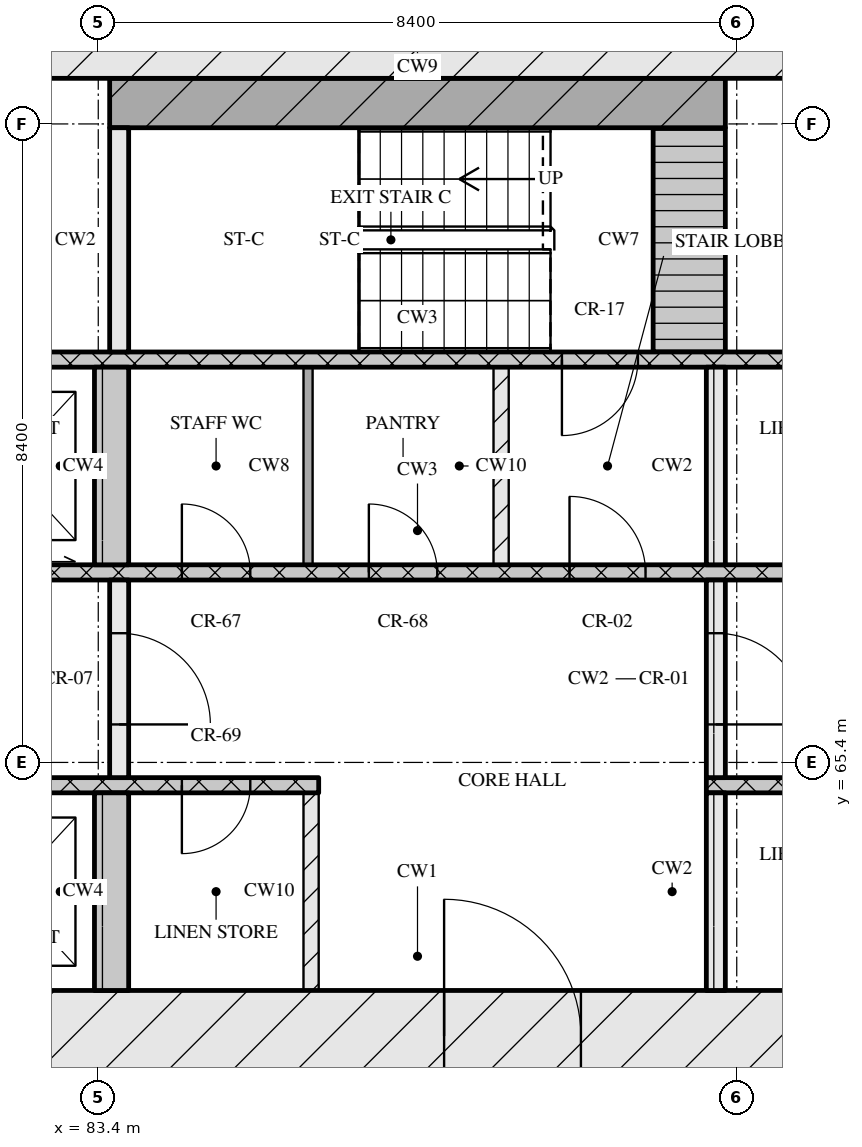
"""IFC4 building model, lengths in metres.
Left out: names, types, materials, properties, quantities, classifications, styles, units other than length and angle.
Written with IfcOpenShell. Run it as: python <this file> out.ifc"""

import sys

from ifc_helpers import new_model, si_unit, direction, frame, frame_2d, origin, place, context, subcontext, project, spatial, rectangle, extrude, element, fill, save


model = new_model("IFC4")
c1 = context("Model", 3, precision=1e-05, world=origin(), true_north=direction((0.0, 1.0)))
c2 = subcontext(c1, "Body", "Model", "MODEL_VIEW")
j1 = project(units=[si_unit("LENGTHUNIT", "METRE"), si_unit("PLANEANGLEUNIT", "RADIAN")], contexts=[c1])
p1 = place(None, origin())
s1 = spatial("IfcSite", under=j1, at=p1, CompositionType="ELEMENT")
p2 = place(p1, origin())
s2 = spatial("IfcBuilding", under=s1, at=p2, CompositionType="ELEMENT")
p3 = place(p2, frame((0.0, 0.0, 73.2)))
s3 = spatial("IfcBuildingStorey", under=s2, at=p3, CompositionType="ELEMENT", Elevation=73.2)
p4 = place(p3, frame((66.6, 61.8, 0.0), z_axis=(0.0, 0.0, 1.0), x_axis=(1.0, 0.0, 0.0)))
e1 = element("IfcWall", 1, at=p4, inside=s3, PredefinedType="SOLIDWALL", context=c2, shape_type="SweptSolid", body=[
    extrude(rectangle(XDim=42.0, YDim=1.2, at=frame_2d((21.0, 0.0))), origin(), (0.0, 0.0, 1.0), 3.32),
])
p5 = place(p4, frame((21.35, 0.0, 0.0)))
e2 = element("IfcOpeningElement", 2, at=p5, cuts=e1, PredefinedType="OPENING", context=c2, shape_type="SweptSolid", body=[
    extrude(rectangle(XDim=1.8, YDim=2.1, at=frame_2d((0.9, 1.05))), frame((0.0, 0.61, 0.0), z_axis=(0.0, -1.0, 0.0), x_axis=(1.0, 0.0, 0.0)), (0.0, 0.0, 1.0), 1.22),
])
p6 = place(p3, frame((66.6, 75.0, 0.0), z_axis=(0.0, 0.0, 1.0), x_axis=(1.0, 0.0, 0.0)))
e3 = element("IfcWall", 3, at=p6, inside=s3, PredefinedType="SOLIDWALL", context=c2, shape_type="SweptSolid", body=[
    extrude(rectangle(XDim=42.0, YDim=1.2, at=frame_2d((21.0, 0.0))), origin(), (0.0, 0.0, 1.0), 3.32),
])
p7 = place(p3, frame((83.575, 62.4, 0.0), z_axis=(0.0, 0.0, 1.0), x_axis=(0.0, 1.0, 0.0)))
e4 = element("IfcWall", 4, at=p7, inside=s3, PredefinedType="SOLIDWALL", context=c2, shape_type="SweptSolid", body=[
    extrude(rectangle(XDim=2.6, YDim=0.45, at=frame_2d((1.3, 0.0))), origin(), (0.0, 0.0, 1.0), 3.32),
])
p8 = place(p3, frame((86.2, 62.4, 0.0), z_axis=(0.0, 0.0, 1.0), x_axis=(0.0, 1.0, 0.0)))
e5 = element("IfcWall", 5, at=p8, inside=s3, PredefinedType="PARTITIONING", context=c2, shape_type="SweptSolid", body=[
    extrude(rectangle(XDim=2.6, YDim=0.2, at=frame_2d((1.3, 0.0))), origin(), (0.0, 0.0, 1.0), 3.32),
])
p9 = place(p3, frame((91.525, 62.4, 0.0), z_axis=(0.0, 0.0, 1.0), x_axis=(0.0, 1.0, 0.0)))
e6 = element("IfcWall", 6, at=p9, inside=s3, PredefinedType="SOLIDWALL", context=c2, shape_type="SweptSolid", body=[
    extrude(rectangle(XDim=2.6, YDim=0.25, at=frame_2d((1.3, 0.0))), origin(), (0.0, 0.0, 1.0), 3.32),
])
p10 = place(p3, frame((67.8, 65.1, 0.0), z_axis=(0.0, 0.0, 1.0), x_axis=(1.0, 0.0, 0.0)))
e7 = element("IfcWall", 7, at=p10, inside=s3, PredefinedType="SOLIDWALL", context=c2, shape_type="SweptSolid", body=[
    extrude(rectangle(XDim=18.5, YDim=0.2, at=frame_2d((9.25, 0.0))), origin(), (0.0, 0.0, 1.0), 3.32),
])
p11 = place(p10, frame((7.27, 0.0, 0.0)))
e8 = element("IfcOpeningElement", 8, at=p11, cuts=e7, PredefinedType="OPENING", context=c2, shape_type="SweptSolid", body=[
    extrude(rectangle(XDim=0.9, YDim=2.1, at=frame_2d((0.45, 1.05))), frame((0.0, 0.11, 0.0), z_axis=(0.0, -1.0, 0.0), x_axis=(1.0, 0.0, 0.0)), (0.0, 0.0, 1.0), 0.22),
])
p12 = place(p10, frame((8.85, 0.0, 0.0)))
e9 = element("IfcOpeningElement", 9, at=p12, cuts=e7, PredefinedType="OPENING", context=c2, shape_type="SweptSolid", body=[
    extrude(rectangle(XDim=1.1, YDim=2.1, at=frame_2d((0.55, 1.05))), frame((0.0, 0.11, 0.0), z_axis=(0.0, -1.0, 0.0), x_axis=(1.0, 0.0, 0.0)), (0.0, 0.0, 1.0), 0.22),
])
p13 = place(p10, frame((11.35, 0.0, 0.0)))
e10 = element("IfcOpeningElement", 10, at=p13, cuts=e7, PredefinedType="OPENING", context=c2, shape_type="SweptSolid", body=[
    extrude(rectangle(XDim=1.1, YDim=2.1, at=frame_2d((0.55, 1.05))), frame((0.0, 0.11, 0.0), z_axis=(0.0, -1.0, 0.0), x_axis=(1.0, 0.0, 0.0)), (0.0, 0.0, 1.0), 0.22),
])
p14 = place(p10, frame((13.85, 0.0, 0.0)))
e11 = element("IfcOpeningElement", 11, at=p14, cuts=e7, PredefinedType="OPENING", context=c2, shape_type="SweptSolid", body=[
    extrude(rectangle(XDim=1.1, YDim=2.1, at=frame_2d((0.55, 1.05))), frame((0.0, 0.11, 0.0), z_axis=(0.0, -1.0, 0.0), x_axis=(1.0, 0.0, 0.0)), (0.0, 0.0, 1.0), 0.22),
])
p15 = place(p10, frame((16.7, 0.0, 0.0)))
e12 = element("IfcOpeningElement", 12, at=p15, cuts=e7, PredefinedType="OPENING", context=c2, shape_type="SweptSolid", body=[
    extrude(rectangle(XDim=0.9, YDim=2.1, at=frame_2d((0.45, 1.05))), frame((0.0, 0.11, 0.0), z_axis=(0.0, -1.0, 0.0), x_axis=(1.0, 0.0, 0.0)), (0.0, 0.0, 1.0), 0.22),
])
p16 = place(p3, frame((91.4, 65.1, 0.0), z_axis=(0.0, 0.0, 1.0), x_axis=(1.0, 0.0, 0.0)))
e13 = element("IfcWall", 13, at=p16, inside=s3, PredefinedType="SOLIDWALL", context=c2, shape_type="SweptSolid", body=[
    extrude(rectangle(XDim=16.0, YDim=0.2, at=frame_2d((8.0, 0.0))), origin(), (0.0, 0.0, 1.0), 3.32),
])
p17 = place(p16, frame((7.83, 0.0, 0.0)))
e14 = element("IfcOpeningElement", 14, at=p17, cuts=e13, PredefinedType="OPENING", context=c2, shape_type="SweptSolid", body=[
    extrude(rectangle(XDim=0.9, YDim=2.1, at=frame_2d((0.45, 1.05))), frame((0.0, 0.11, 0.0), z_axis=(0.0, -1.0, 0.0), x_axis=(1.0, 0.0, 0.0)), (0.0, 0.0, 1.0), 0.22),
])
p18 = place(p3, frame((83.675, 65.2, 0.0), z_axis=(0.0, 0.0, 1.0), x_axis=(0.0, 1.0, 0.0)))
e15 = element("IfcWall", 15, at=p18, inside=s3, PredefinedType="SOLIDWALL", context=c2, shape_type="SweptSolid", body=[
    extrude(rectangle(XDim=2.6, YDim=0.25, at=frame_2d((1.3, 0.0))), origin(), (0.0, 0.0, 1.0), 3.32),
])
p19 = place(p18, frame((0.7, 0.0, 0.0)))
e16 = element("IfcOpeningElement", 16, at=p19, cuts=e15, PredefinedType="OPENING", context=c2, shape_type="SweptSolid", body=[
    extrude(rectangle(XDim=1.2, YDim=2.1, at=frame_2d((0.6, 1.05))), frame((0.0, 0.135, 0.0), z_axis=(0.0, -1.0, 0.0), x_axis=(1.0, 0.0, 0.0)), (0.0, 0.0, 1.0), 0.27),
])
p20 = place(p3, frame((91.525, 65.2, 0.0), z_axis=(0.0, 0.0, 1.0), x_axis=(0.0, 1.0, 0.0)))
e17 = element("IfcWall", 17, at=p20, inside=s3, PredefinedType="SOLIDWALL", context=c2, shape_type="SweptSolid", body=[
    extrude(rectangle(XDim=2.6, YDim=0.25, at=frame_2d((1.3, 0.0))), origin(), (0.0, 0.0, 1.0), 3.32),
])
p21 = place(p20, frame((0.7, 0.0, 0.0)))
e18 = element("IfcOpeningElement", 18, at=p21, cuts=e17, PredefinedType="OPENING", context=c2, shape_type="SweptSolid", body=[
    extrude(rectangle(XDim=1.2, YDim=2.1, at=frame_2d((0.6, 1.05))), frame((0.0, 0.135, 0.0), z_axis=(0.0, -1.0, 0.0), x_axis=(1.0, 0.0, 0.0)), (0.0, 0.0, 1.0), 0.27),
])
p22 = place(p3, frame((76.05, 67.9, 0.0), z_axis=(0.0, 0.0, 1.0), x_axis=(1.0, 0.0, 0.0)))
e19 = element("IfcWall", 19, at=p22, inside=s3, PredefinedType="SOLIDWALL", context=c2, shape_type="SweptSolid", body=[
    extrude(rectangle(XDim=23.1, YDim=0.2, at=frame_2d((11.55, 0.0))), origin(), (0.0, 0.0, 1.0), 3.32),
])
p23 = place(p22, frame((0.6, 0.0, 0.0)))
e20 = element("IfcOpeningElement", 20, at=p23, cuts=e19, PredefinedType="OPENING", context=c2, shape_type="SweptSolid", body=[
    extrude(rectangle(XDim=1.1, YDim=2.1, at=frame_2d((0.55, 1.05))), frame((0.0, 0.11, 0.0), z_axis=(0.0, -1.0, 0.0), x_axis=(1.0, 0.0, 0.0)), (0.0, 0.0, 1.0), 0.22),
])
p24 = place(p22, frame((3.1, 0.0, 0.0)))
e21 = element("IfcOpeningElement", 21, at=p24, cuts=e19, PredefinedType="OPENING", context=c2, shape_type="SweptSolid", body=[
    extrude(rectangle(XDim=1.1, YDim=2.1, at=frame_2d((0.55, 1.05))), frame((0.0, 0.11, 0.0), z_axis=(0.0, -1.0, 0.0), x_axis=(1.0, 0.0, 0.0)), (0.0, 0.0, 1.0), 0.22),
])
p25 = place(p22, frame((5.6, 0.0, 0.0)))
e22 = element("IfcOpeningElement", 22, at=p25, cuts=e19, PredefinedType="OPENING", context=c2, shape_type="SweptSolid", body=[
    extrude(rectangle(XDim=1.1, YDim=2.1, at=frame_2d((0.55, 1.05))), frame((0.0, 0.11, 0.0), z_axis=(0.0, -1.0, 0.0), x_axis=(1.0, 0.0, 0.0)), (0.0, 0.0, 1.0), 0.22),
])
p26 = place(p22, frame((8.45, 0.0, 0.0)))
e23 = element("IfcOpeningElement", 23, at=p26, cuts=e19, PredefinedType="OPENING", context=c2, shape_type="SweptSolid", body=[
    extrude(rectangle(XDim=0.9, YDim=2.1, at=frame_2d((0.45, 1.05))), frame((0.0, 0.11, 0.0), z_axis=(0.0, -1.0, 0.0), x_axis=(1.0, 0.0, 0.0)), (0.0, 0.0, 1.0), 0.22),
])
p27 = place(p22, frame((10.91, 0.0, 0.0)))
e24 = element("IfcOpeningElement", 24, at=p27, cuts=e19, PredefinedType="OPENING", context=c2, shape_type="SweptSolid", body=[
    extrude(rectangle(XDim=0.9, YDim=2.1, at=frame_2d((0.45, 1.05))), frame((0.0, 0.11, 0.0), z_axis=(0.0, -1.0, 0.0), x_axis=(1.0, 0.0, 0.0)), (0.0, 0.0, 1.0), 0.22),
])
p28 = place(p22, frame((13.55, 0.0, 0.0)))
e25 = element("IfcOpeningElement", 25, at=p28, cuts=e19, PredefinedType="OPENING", context=c2, shape_type="SweptSolid", body=[
    extrude(rectangle(XDim=1.0, YDim=2.1, at=frame_2d((0.5, 1.05))), frame((0.0, 0.11, 0.0), z_axis=(0.0, -1.0, 0.0), x_axis=(1.0, 0.0, 0.0)), (0.0, 0.0, 1.0), 0.22),
])
p29 = place(p3, frame((83.575, 68.0, 0.0), z_axis=(0.0, 0.0, 1.0), x_axis=(0.0, 1.0, 0.0)))
e26 = element("IfcWall", 26, at=p29, inside=s3, PredefinedType="SOLIDWALL", context=c2, shape_type="SweptSolid", body=[
    extrude(rectangle(XDim=2.6, YDim=0.45, at=frame_2d((1.3, 0.0))), origin(), (0.0, 0.0, 1.0), 3.32),
])
p30 = place(p3, frame((86.16, 68.0, 0.0), z_axis=(0.0, 0.0, 1.0), x_axis=(0.0, 1.0, 0.0)))
e27 = element("IfcWall", 27, at=p30, inside=s3, PredefinedType="PARTITIONING", context=c2, shape_type="SweptSolid", body=[
    extrude(rectangle(XDim=2.6, YDim=0.12, at=frame_2d((1.3, 0.0))), origin(), (0.0, 0.0, 1.0), 3.32),
])
p31 = place(p3, frame((88.7, 68.0, 0.0), z_axis=(0.0, 0.0, 1.0), x_axis=(0.0, 1.0, 0.0)))
e28 = element("IfcWall", 28, at=p31, inside=s3, PredefinedType="PARTITIONING", context=c2, shape_type="SweptSolid", body=[
    extrude(rectangle(XDim=2.6, YDim=0.2, at=frame_2d((1.3, 0.0))), origin(), (0.0, 0.0, 1.0), 3.32),
])
p32 = place(p3, frame((91.525, 68.0, 0.0), z_axis=(0.0, 0.0, 1.0), x_axis=(0.0, 1.0, 0.0)))
e29 = element("IfcWall", 29, at=p32, inside=s3, PredefinedType="SOLIDWALL", context=c2, shape_type="SweptSolid", body=[
    extrude(rectangle(XDim=2.6, YDim=0.25, at=frame_2d((1.3, 0.0))), origin(), (0.0, 0.0, 1.0), 3.32),
])
p33 = place(p3, frame((67.8, 70.7, 0.0), z_axis=(0.0, 0.0, 1.0), x_axis=(1.0, 0.0, 0.0)))
e30 = element("IfcWall", 30, at=p33, inside=s3, PredefinedType="SOLIDWALL", context=c2, shape_type="SweptSolid", body=[
    extrude(rectangle(XDim=39.6, YDim=0.2, at=frame_2d((19.8, 0.0))), origin(), (0.0, 0.0, 1.0), 3.32),
])
p34 = place(p33, frame((0.65, 0.0, 0.0)))
e31 = element("IfcOpeningElement", 31, at=p34, cuts=e30, PredefinedType="OPENING", context=c2, shape_type="SweptSolid", body=[
    extrude(rectangle(XDim=1.1, YDim=2.1, at=frame_2d((0.55, 1.05))), frame((0.0, 0.11, 0.0), z_axis=(0.0, -1.0, 0.0), x_axis=(1.0, 0.0, 0.0)), (0.0, 0.0, 1.0), 0.22),
])
p35 = place(p33, frame((3.25, 0.0, 0.0)))
e32 = element("IfcOpeningElement", 32, at=p35, cuts=e30, PredefinedType="OPENING", context=c2, shape_type="SweptSolid", body=[
    extrude(rectangle(XDim=1.1, YDim=2.1, at=frame_2d((0.55, 1.05))), frame((0.0, 0.11, 0.0), z_axis=(0.0, -1.0, 0.0), x_axis=(1.0, 0.0, 0.0)), (0.0, 0.0, 1.0), 0.22),
])
p36 = place(p33, frame((5.9, 0.0, 0.0)))
e33 = element("IfcOpeningElement", 33, at=p36, cuts=e30, PredefinedType="OPENING", context=c2, shape_type="SweptSolid", body=[
    extrude(rectangle(XDim=1.0, YDim=2.1, at=frame_2d((0.5, 1.05))), frame((0.0, 0.11, 0.0), z_axis=(0.0, -1.0, 0.0), x_axis=(1.0, 0.0, 0.0)), (0.0, 0.0, 1.0), 0.22),
])
p37 = place(p33, frame((21.7, 0.0, 0.0)))
e34 = element("IfcOpeningElement", 34, at=p37, cuts=e30, PredefinedType="OPENING", context=c2, shape_type="SweptSolid", body=[
    extrude(rectangle(XDim=1.0, YDim=2.1, at=frame_2d((0.5, 1.05))), frame((0.0, 0.11, 0.0), z_axis=(0.0, -1.0, 0.0), x_axis=(1.0, 0.0, 0.0)), (0.0, 0.0, 1.0), 0.22),
])
p38 = place(p33, frame((32.7, 0.0, 0.0)))
e35 = element("IfcOpeningElement", 35, at=p38, cuts=e30, PredefinedType="OPENING", context=c2, shape_type="SweptSolid", body=[
    extrude(rectangle(XDim=1.0, YDim=2.1, at=frame_2d((0.5, 1.05))), frame((0.0, 0.11, 0.0), z_axis=(0.0, -1.0, 0.0), x_axis=(1.0, 0.0, 0.0)), (0.0, 0.0, 1.0), 0.22),
])
p39 = place(p33, frame((35.25, 0.0, 0.0)))
e36 = element("IfcOpeningElement", 36, at=p39, cuts=e30, PredefinedType="OPENING", context=c2, shape_type="SweptSolid", body=[
    extrude(rectangle(XDim=1.1, YDim=2.1, at=frame_2d((0.55, 1.05))), frame((0.0, 0.11, 0.0), z_axis=(0.0, -1.0, 0.0), x_axis=(1.0, 0.0, 0.0)), (0.0, 0.0, 1.0), 0.22),
])
p40 = place(p33, frame((37.85, 0.0, 0.0)))
e37 = element("IfcOpeningElement", 37, at=p40, cuts=e30, PredefinedType="OPENING", context=c2, shape_type="SweptSolid", body=[
    extrude(rectangle(XDim=1.1, YDim=2.1, at=frame_2d((0.55, 1.05))), frame((0.0, 0.11, 0.0), z_axis=(0.0, -1.0, 0.0), x_axis=(1.0, 0.0, 0.0)), (0.0, 0.0, 1.0), 0.22),
])
p41 = place(p3, frame((83.675, 70.8, 0.0), z_axis=(0.0, 0.0, 1.0), x_axis=(0.0, 1.0, 0.0)))
e38 = element("IfcWall", 38, at=p41, inside=s3, PredefinedType="SOLIDWALL", context=c2, shape_type="SweptSolid", body=[
    extrude(rectangle(XDim=2.95, YDim=0.25, at=frame_2d((1.475, 0.0))), origin(), (0.0, 0.0, 1.0), 3.32),
])
p42 = place(p3, frame((91.175, 70.8, 0.0), z_axis=(0.0, 0.0, 1.0), x_axis=(0.0, 1.0, 0.0)))
e39 = element("IfcWall", 39, at=p42, inside=s3, PredefinedType="SOLIDWALL", context=c2, shape_type="SweptSolid", body=[
    extrude(rectangle(XDim=2.95, YDim=0.95, at=frame_2d((1.475, 0.0))), origin(), (0.0, 0.0, 1.0), 3.32),
])
p43 = place(p3, frame((83.55, 74.075, 0.0), z_axis=(0.0, 0.0, 1.0), x_axis=(1.0, 0.0, 0.0)))
e40 = element("IfcWall", 40, at=p43, inside=s3, PredefinedType="SOLIDWALL", context=c2, shape_type="SweptSolid", body=[
    extrude(rectangle(XDim=8.1, YDim=0.65, at=frame_2d((4.05, 0.0))), origin(), (0.0, 0.0, 1.0), 3.32),
])
p44 = place(p5, origin())
e41 = element("IfcDoor", 41, at=p44, inside=s3, OperationType="DOUBLE_DOOR_SINGLE_SWING", PredefinedType="DOOR", context=c2, shape_type="SweptSolid", body=[
    extrude(rectangle(XDim=1.8, YDim=2.1, at=frame_2d((0.9, 1.05))), frame((0.0, 0.025, 0.0), z_axis=(0.0, -1.0, 0.0), x_axis=(1.0, 0.0, 0.0)), (0.0, 0.0, 1.0), 0.05),
])
fill(e2, e41)
p45 = place(p15, origin())
e42 = element("IfcDoor", 42, at=p45, inside=s3, OperationType="SINGLE_SWING_RIGHT", PredefinedType="DOOR", context=c2, shape_type="SweptSolid", body=[
    extrude(rectangle(XDim=0.9, YDim=2.1, at=frame_2d((0.45, 1.05))), frame((0.0, 0.025, 0.0), z_axis=(0.0, -1.0, 0.0), x_axis=(1.0, 0.0, 0.0)), (0.0, 0.0, 1.0), 0.05),
])
fill(e12, e42)
p46 = place(p19, origin())
e43 = element("IfcDoor", 43, at=p46, inside=s3, OperationType="SINGLE_SWING_RIGHT", PredefinedType="DOOR", context=c2, shape_type="SweptSolid", body=[
    extrude(rectangle(XDim=1.2, YDim=2.1, at=frame_2d((0.6, 1.05))), frame((0.0, 0.025, 0.0), z_axis=(0.0, -1.0, 0.0), x_axis=(1.0, 0.0, 0.0)), (0.0, 0.0, 1.0), 0.05),
])
fill(e16, e43)
p47 = place(p21, origin())
e44 = element("IfcDoor", 44, at=p47, inside=s3, OperationType="SINGLE_SWING_RIGHT", PredefinedType="DOOR", context=c2, shape_type="SweptSolid", body=[
    extrude(rectangle(XDim=1.2, YDim=2.1, at=frame_2d((0.6, 1.05))), frame((0.0, 0.025, 0.0), z_axis=(0.0, -1.0, 0.0), x_axis=(1.0, 0.0, 0.0)), (0.0, 0.0, 1.0), 0.05),
])
fill(e18, e44)
p48 = place(p26, origin())
e45 = element("IfcDoor", 45, at=p48, inside=s3, OperationType="SINGLE_SWING_LEFT", PredefinedType="DOOR", context=c2, shape_type="SweptSolid", body=[
    extrude(rectangle(XDim=0.9, YDim=2.1, at=frame_2d((0.45, 1.05))), frame((0.0, 0.025, 0.0), z_axis=(0.0, -1.0, 0.0), x_axis=(1.0, 0.0, 0.0)), (0.0, 0.0, 1.0), 0.05),
])
fill(e23, e45)
p49 = place(p27, origin())
e46 = element("IfcDoor", 46, at=p49, inside=s3, OperationType="SINGLE_SWING_LEFT", PredefinedType="DOOR", context=c2, shape_type="SweptSolid", body=[
    extrude(rectangle(XDim=0.9, YDim=2.1, at=frame_2d((0.45, 1.05))), frame((0.0, 0.025, 0.0), z_axis=(0.0, -1.0, 0.0), x_axis=(1.0, 0.0, 0.0)), (0.0, 0.0, 1.0), 0.05),
])
fill(e24, e46)
p50 = place(p28, origin())
e47 = element("IfcDoor", 47, at=p50, inside=s3, OperationType="SINGLE_SWING_LEFT", PredefinedType="DOOR", context=c2, shape_type="SweptSolid", body=[
    extrude(rectangle(XDim=1.0, YDim=2.1, at=frame_2d((0.5, 1.05))), frame((0.0, 0.025, 0.0), z_axis=(0.0, -1.0, 0.0), x_axis=(1.0, 0.0, 0.0)), (0.0, 0.0, 1.0), 0.05),
])
fill(e25, e47)
p51 = place(p37, origin())
e48 = element("IfcDoor", 48, at=p51, inside=s3, OperationType="SINGLE_SWING_RIGHT", PredefinedType="DOOR", context=c2, shape_type="SweptSolid", body=[
    extrude(rectangle(XDim=1.0, YDim=2.1, at=frame_2d((0.5, 1.05))), frame((0.0, 0.025, 0.0), z_axis=(0.0, -1.0, 0.0), x_axis=(1.0, 0.0, 0.0)), (0.0, 0.0, 1.0), 0.05),
])
fill(e34, e48)
save(model, sys.argv[1])
